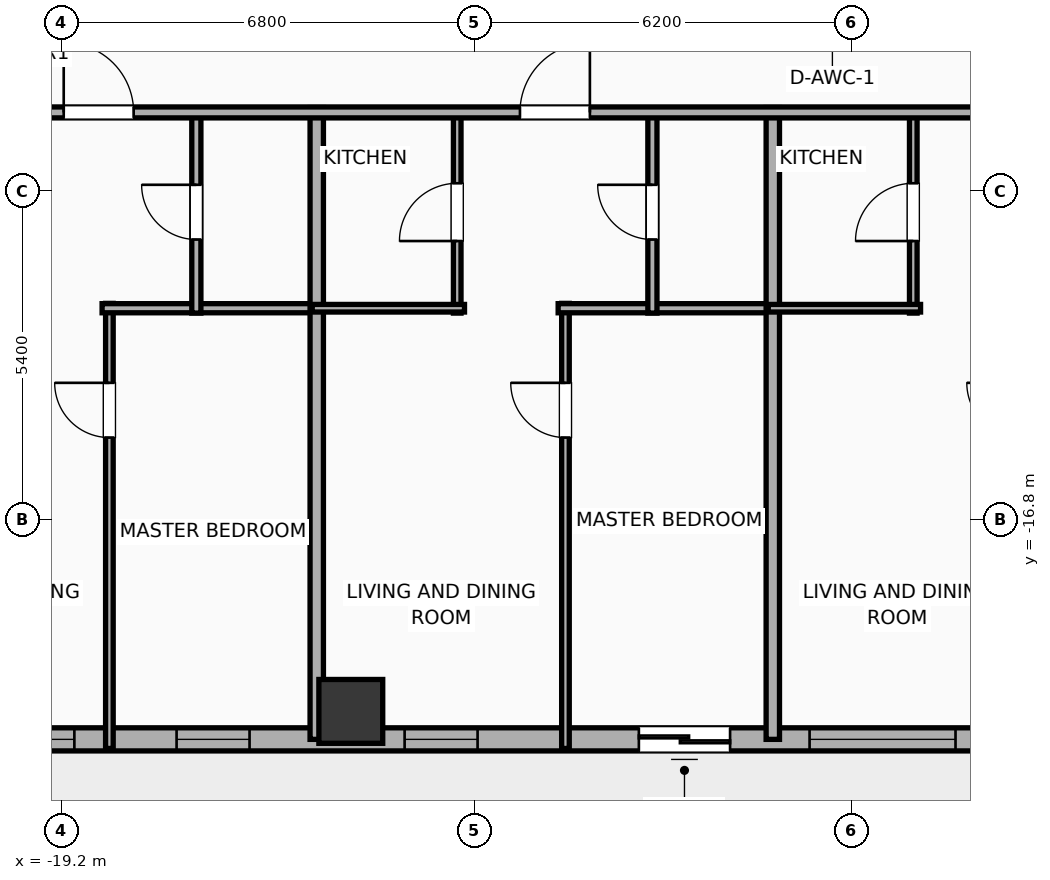
"""IFC4 building model, lengths in metres.
Left out: names, types, materials, properties, quantities, classifications, styles, units other than length and angle.
Written with IfcOpenShell. Run it as: python <this file> out.ifc"""

import sys

from ifc_helpers import new_model, si_unit, direction, frame, frame_2d, origin, origin_2d, place, context, subcontext, project, spatial, rectangle, hollow_rectangle, extrude, element, fill, save


model = new_model("IFC4")
c1 = context("Model", 3, precision=1e-05, world=origin(), true_north=direction((0.0, 1.0)))
c2 = subcontext(c1, "Body", "Model", "MODEL_VIEW")
j1 = project(units=[si_unit("LENGTHUNIT", "METRE"), si_unit("PLANEANGLEUNIT", "RADIAN")], contexts=[c1])
p1 = place(None, origin())
s1 = spatial("IfcSite", under=j1, at=p1, CompositionType="ELEMENT")
p2 = place(p1, origin())
s2 = spatial("IfcBuilding", under=s1, at=p2, CompositionType="ELEMENT")
p3 = place(p2, frame((0.0, 0.0, 113.1)))
s3 = spatial("IfcBuildingStorey", under=s2, at=p3, CompositionType="ELEMENT", Elevation=113.1)
p4 = place(p3, frame((-14.44, -19.95, 0.0), z_axis=(0.0, 0.0, 1.0), x_axis=(1.0, 0.0, 0.0)))
e1 = element("IfcColumn", 1, at=p4, inside=s3, PredefinedType="COLUMN", context=c2, shape_type="SweptSolid", body=[
    extrude(hollow_rectangle(XDim=1.05, YDim=1.05, WallThickness=0.036, at=origin_2d()), origin(), (0.0, 0.0, 1.0), 3.9),
])
p5 = place(p3, frame((29.381, -20.41, 0.0), z_axis=(0.0, 0.0, 1.0), x_axis=(-1.0, 0.0, 0.0)))
e2 = element("IfcWall", 2, at=p5, inside=s3, PredefinedType="ELEMENTEDWALL", context=c2, shape_type="SweptSolid", body=[
    extrude(rectangle(XDim=54.763, YDim=0.38, at=frame_2d((27.381, 0.0))), origin(), (0.0, 0.0, 1.0), 3.65),
])
p6 = place(p5, frame((15.679, 0.0, 0.0)))
e3 = element("IfcOpeningElement", 3, at=p6, cuts=e2, PredefinedType="OPENING", context=c2, shape_type="SweptSolid", body=[
    extrude(rectangle(XDim=1.5, YDim=2.05, at=frame_2d((0.75, 1.025))), frame((0.0, 0.2, 0.0), z_axis=(0.0, -1.0, 0.0), x_axis=(1.0, 0.0, 0.0)), (0.0, 0.0, 1.0), 0.4),
])
p7 = place(p5, frame((7.295, 0.0, 0.75)))
e4 = element("IfcOpeningElement", 4, at=p7, cuts=e2, PredefinedType="OPENING", context=c2, shape_type="SweptSolid", body=[
    extrude(rectangle(XDim=2.4, YDim=2.1, at=frame_2d((1.2, 1.05))), frame((0.0, 0.2, 0.0), z_axis=(0.0, -1.0, 0.0), x_axis=(1.0, 0.0, 0.0)), (0.0, 0.0, 1.0), 0.4),
])
p8 = place(p5, frame((18.486, 0.0, 0.75)))
e5 = element("IfcOpeningElement", 5, at=p8, cuts=e2, PredefinedType="OPENING", context=c2, shape_type="SweptSolid", body=[
    extrude(rectangle(XDim=2.4, YDim=2.1, at=frame_2d((1.2, 1.05))), frame((0.0, 0.2, 0.0), z_axis=(0.0, -1.0, 0.0), x_axis=(1.0, 0.0, 0.0)), (0.0, 0.0, 1.0), 0.4),
])
p9 = place(p5, frame((33.877, 0.0, 0.75)))
e6 = element("IfcOpeningElement", 6, at=p9, cuts=e2, PredefinedType="OPENING", context=c2, shape_type="SweptSolid", body=[
    extrude(rectangle(XDim=2.4, YDim=2.1, at=frame_2d((1.2, 1.05))), frame((0.0, 0.2, 0.0), z_axis=(0.0, -1.0, 0.0), x_axis=(1.0, 0.0, 0.0)), (0.0, 0.0, 1.0), 0.4),
])
p10 = place(p5, frame((48.367, 0.0, 0.75)))
e7 = element("IfcOpeningElement", 7, at=p10, cuts=e2, PredefinedType="OPENING", context=c2, shape_type="SweptSolid", body=[
    extrude(rectangle(XDim=2.4, YDim=2.1, at=frame_2d((1.2, 1.05))), frame((0.0, 0.2, 0.0), z_axis=(0.0, -1.0, 0.0), x_axis=(1.0, 0.0, 0.0)), (0.0, 0.0, 1.0), 0.4),
])
p11 = place(p5, frame((37.584, 0.0, 0.0)))
e8 = element("IfcOpeningElement", 8, at=p11, cuts=e2, PredefinedType="OPENING", context=c2, shape_type="SweptSolid", body=[
    extrude(rectangle(XDim=1.5, YDim=2.05, at=frame_2d((0.75, 1.025))), frame((0.0, 0.2, 0.0), z_axis=(0.0, -1.0, 0.0), x_axis=(1.0, 0.0, 0.0)), (0.0, 0.0, 1.0), 0.4),
])
p12 = place(p5, frame((52.277, 0.0, 0.75)))
e9 = element("IfcOpeningElement", 9, at=p12, cuts=e2, PredefinedType="OPENING", context=c2, shape_type="SweptSolid", body=[
    extrude(rectangle(XDim=1.2, YDim=2.05, at=frame_2d((0.6, 1.025))), frame((0.0, 0.2, 0.0), z_axis=(0.0, -1.0, 0.0), x_axis=(1.0, 0.0, 0.0)), (0.0, 0.0, 1.0), 0.4),
])
p13 = place(p5, frame((45.486, 0.0, 0.75)))
e10 = element("IfcOpeningElement", 10, at=p13, cuts=e2, PredefinedType="OPENING", context=c2, shape_type="SweptSolid", body=[
    extrude(rectangle(XDim=1.2, YDim=2.05, at=frame_2d((0.6, 1.025))), frame((0.0, 0.2, 0.0), z_axis=(0.0, -1.0, 0.0), x_axis=(1.0, 0.0, 0.0)), (0.0, 0.0, 1.0), 0.4),
])
p14 = place(p5, frame((41.736, 0.0, 0.75)))
e11 = element("IfcOpeningElement", 11, at=p14, cuts=e2, PredefinedType="OPENING", context=c2, shape_type="SweptSolid", body=[
    extrude(rectangle(XDim=1.2, YDim=2.05, at=frame_2d((0.6, 1.025))), frame((0.0, 0.2, 0.0), z_axis=(0.0, -1.0, 0.0), x_axis=(1.0, 0.0, 0.0)), (0.0, 0.0, 1.0), 0.4),
])
p15 = place(p5, frame((30.486, 0.0, 0.75)))
e12 = element("IfcOpeningElement", 12, at=p15, cuts=e2, PredefinedType="OPENING", context=c2, shape_type="SweptSolid", body=[
    extrude(rectangle(XDim=1.2, YDim=2.05, at=frame_2d((0.6, 1.025))), frame((0.0, 0.2, 0.0), z_axis=(0.0, -1.0, 0.0), x_axis=(1.0, 0.0, 0.0)), (0.0, 0.0, 1.0), 0.4),
])
p16 = place(p5, frame((26.736, 0.0, 0.75)))
e13 = element("IfcOpeningElement", 13, at=p16, cuts=e2, PredefinedType="OPENING", context=c2, shape_type="SweptSolid", body=[
    extrude(rectangle(XDim=1.2, YDim=2.05, at=frame_2d((0.6, 1.025))), frame((0.0, 0.2, 0.0), z_axis=(0.0, -1.0, 0.0), x_axis=(1.0, 0.0, 0.0)), (0.0, 0.0, 1.0), 0.4),
])
p17 = place(p5, frame((22.986, 0.0, 0.75)))
e14 = element("IfcOpeningElement", 14, at=p17, cuts=e2, PredefinedType="OPENING", context=c2, shape_type="SweptSolid", body=[
    extrude(rectangle(XDim=1.2, YDim=2.05, at=frame_2d((0.6, 1.025))), frame((0.0, 0.2, 0.0), z_axis=(0.0, -1.0, 0.0), x_axis=(1.0, 0.0, 0.0)), (0.0, 0.0, 1.0), 0.4),
])
p18 = place(p5, frame((11.736, 0.0, 0.75)))
e15 = element("IfcOpeningElement", 15, at=p18, cuts=e2, PredefinedType="OPENING", context=c2, shape_type="SweptSolid", body=[
    extrude(rectangle(XDim=1.2, YDim=2.05, at=frame_2d((0.6, 1.025))), frame((0.0, 0.2, 0.0), z_axis=(0.0, -1.0, 0.0), x_axis=(1.0, 0.0, 0.0)), (0.0, 0.0, 1.0), 0.4),
])
p19 = place(p5, frame((3.286, 0.0, 0.75)))
e16 = element("IfcOpeningElement", 16, at=p19, cuts=e2, PredefinedType="OPENING", context=c2, shape_type="SweptSolid", body=[
    extrude(rectangle(XDim=1.2, YDim=2.05, at=frame_2d((0.6, 1.025))), frame((0.0, 0.2, 0.0), z_axis=(0.0, -1.0, 0.0), x_axis=(1.0, 0.0, 0.0)), (0.0, 0.0, 1.0), 0.4),
])
p20 = place(p3, frame((-18.41, -20.56, 0.0), z_axis=(0.0, 0.0, 1.0), x_axis=(0.0, 1.0, 0.0)))
e17 = element("IfcWall", 17, at=p20, inside=s3, PredefinedType="PARTITIONING", context=c2, shape_type="SweptSolid", body=[
    extrude(rectangle(XDim=7.32, YDim=0.125, at=frame_2d((3.66, 0.0))), origin(), (0.0, 0.0, 1.0), 3.65),
])
p21 = place(p20, frame((5.113, 0.0, 0.0)))
e18 = element("IfcOpeningElement", 18, at=p21, cuts=e17, PredefinedType="OPENING", context=c2, shape_type="SweptSolid", body=[
    extrude(rectangle(XDim=0.9, YDim=2.05, at=frame_2d((0.45, 1.025))), frame((0.0, 0.073, 0.0), z_axis=(0.0, -1.0, 0.0), x_axis=(1.0, 0.0, 0.0)), (0.0, 0.0, 1.0), 0.145),
])
p22 = place(p3, frame((-18.53, -13.32, 0.0), z_axis=(0.0, 0.0, 1.0), x_axis=(1.0, 0.0, 0.0)))
e19 = element("IfcWall", 19, at=p22, inside=s3, PredefinedType="PLUMBINGWALL", context=c2, shape_type="SweptSolid", body=[
    extrude(rectangle(XDim=3.605, YDim=0.15, at=frame_2d((1.802, 0.0))), origin(), (0.0, 0.0, 1.0), 3.65),
])
p23 = place(p3, frame((-16.98, -13.4, 0.0), z_axis=(0.0, 0.0, 1.0), x_axis=(0.0, 1.0, 0.0)))
e20 = element("IfcWall", 20, at=p23, inside=s3, PredefinedType="PLUMBINGWALL", context=c2, shape_type="SweptSolid", body=[
    extrude(rectangle(XDim=3.32, YDim=0.15, at=frame_2d((1.66, 0.0))), origin(), (0.0, 0.0, 1.0), 3.65),
])
p24 = place(p23, frame((1.21, 0.0, 0.0)))
e21 = element("IfcOpeningElement", 21, at=p24, cuts=e20, PredefinedType="OPENING", context=c2, shape_type="SweptSolid", body=[
    extrude(rectangle(XDim=0.9, YDim=2.05, at=frame_2d((0.45, 1.025))), frame((0.0, 0.085, 0.0), z_axis=(0.0, -1.0, 0.0), x_axis=(1.0, 0.0, 0.0)), (0.0, 0.0, 1.0), 0.17),
])
p25 = place(p3, frame((-15.0, -20.41, 0.0), z_axis=(0.0, 0.0, 1.0), x_axis=(0.0, 1.0, 0.0)))
e22 = element("IfcWall", 22, at=p25, inside=s3, PredefinedType="PARTITIONING", context=c2, shape_type="SweptSolid", body=[
    extrude(rectangle(XDim=10.39, YDim=0.22, at=frame_2d((5.195, 0.0))), origin(), (0.0, 0.0, 1.0), 3.04),
])
p26 = place(p3, frame((-10.91, -20.56, 0.0), z_axis=(0.0, 0.0, 1.0), x_axis=(0.0, 1.0, 0.0)))
e23 = element("IfcWall", 23, at=p26, inside=s3, PredefinedType="PARTITIONING", context=c2, shape_type="SweptSolid", body=[
    extrude(rectangle(XDim=7.32, YDim=0.125, at=frame_2d((3.66, 0.0))), origin(), (0.0, 0.0, 1.0), 3.65),
])
p27 = place(p26, frame((5.113, 0.0, 0.0)))
e24 = element("IfcOpeningElement", 24, at=p27, cuts=e23, PredefinedType="OPENING", context=c2, shape_type="SweptSolid", body=[
    extrude(rectangle(XDim=0.9, YDim=2.05, at=frame_2d((0.45, 1.025))), frame((0.0, 0.073, 0.0), z_axis=(0.0, -1.0, 0.0), x_axis=(1.0, 0.0, 0.0)), (0.0, 0.0, 1.0), 0.145),
])
p28 = place(p3, frame((-11.03, -13.32, 0.0), z_axis=(0.0, 0.0, 1.0), x_axis=(1.0, 0.0, 0.0)))
e25 = element("IfcWall", 25, at=p28, inside=s3, PredefinedType="PLUMBINGWALL", context=c2, shape_type="SweptSolid", body=[
    extrude(rectangle(XDim=3.605, YDim=0.15, at=frame_2d((1.802, 0.0))), origin(), (0.0, 0.0, 1.0), 3.65),
])
p29 = place(p3, frame((-12.69, -13.4, 0.0), z_axis=(0.0, 0.0, 1.0), x_axis=(0.0, 1.0, 0.0)))
e26 = element("IfcWall", 26, at=p29, inside=s3, PredefinedType="PARTITIONING", context=c2, shape_type="SweptSolid", body=[
    extrude(rectangle(XDim=3.32, YDim=0.125, at=frame_2d((1.66, 0.0))), origin(), (0.0, 0.0, 1.0), 3.65),
])
p30 = place(p29, frame((1.185, 0.0, 0.0)))
e27 = element("IfcOpeningElement", 27, at=p30, cuts=e26, PredefinedType="OPENING", context=c2, shape_type="SweptSolid", body=[
    extrude(rectangle(XDim=0.95, YDim=2.05, at=frame_2d((0.475, 1.025))), frame((0.0, 0.073, 0.0), z_axis=(0.0, -1.0, 0.0), x_axis=(1.0, 0.0, 0.0)), (0.0, 0.0, 1.0), 0.145),
])
p31 = place(p3, frame((-15.075, -13.32, 0.0), z_axis=(0.0, 0.0, 1.0), x_axis=(1.0, 0.0, 0.0)))
e28 = element("IfcWall", 28, at=p31, inside=s3, PredefinedType="PARTITIONING", context=c2, shape_type="SweptSolid", body=[
    extrude(rectangle(XDim=2.505, YDim=0.125, at=frame_2d((1.252, 0.0))), origin(), (0.0, 0.0, 1.0), 3.65),
])
p32 = place(p3, frame((-9.48, -13.4, 0.0), z_axis=(0.0, 0.0, 1.0), x_axis=(0.0, 1.0, 0.0)))
e29 = element("IfcWall", 29, at=p32, inside=s3, PredefinedType="PLUMBINGWALL", context=c2, shape_type="SweptSolid", body=[
    extrude(rectangle(XDim=3.32, YDim=0.15, at=frame_2d((1.66, 0.0))), origin(), (0.0, 0.0, 1.0), 3.65),
])
p33 = place(p32, frame((1.21, 0.0, 0.0)))
e30 = element("IfcOpeningElement", 30, at=p33, cuts=e29, PredefinedType="OPENING", context=c2, shape_type="SweptSolid", body=[
    extrude(rectangle(XDim=0.9, YDim=2.05, at=frame_2d((0.45, 1.025))), frame((0.0, 0.085, 0.0), z_axis=(0.0, -1.0, 0.0), x_axis=(1.0, 0.0, 0.0)), (0.0, 0.0, 1.0), 0.17),
])
p34 = place(p3, frame((-7.5, -20.41, 0.0), z_axis=(0.0, 0.0, 1.0), x_axis=(0.0, 1.0, 0.0)))
e31 = element("IfcWall", 31, at=p34, inside=s3, PredefinedType="PARTITIONING", context=c2, shape_type="SweptSolid", body=[
    extrude(rectangle(XDim=10.39, YDim=0.22, at=frame_2d((5.195, 0.0))), origin(), (0.0, 0.0, 1.0), 3.65),
])
p35 = place(p3, frame((-5.19, -13.4, 0.0), z_axis=(0.0, 0.0, 1.0), x_axis=(0.0, 1.0, 0.0)))
e32 = element("IfcWall", 32, at=p35, inside=s3, PredefinedType="PARTITIONING", context=c2, shape_type="SweptSolid", body=[
    extrude(rectangle(XDim=3.32, YDim=0.125, at=frame_2d((1.66, 0.0))), origin(), (0.0, 0.0, 1.0), 3.65),
])
p36 = place(p35, frame((1.185, 0.0, 0.0)))
e33 = element("IfcOpeningElement", 33, at=p36, cuts=e32, PredefinedType="OPENING", context=c2, shape_type="SweptSolid", body=[
    extrude(rectangle(XDim=0.95, YDim=2.05, at=frame_2d((0.475, 1.025))), frame((0.0, 0.073, 0.0), z_axis=(0.0, -1.0, 0.0), x_axis=(1.0, 0.0, 0.0)), (0.0, 0.0, 1.0), 0.145),
])
p37 = place(p3, frame((-7.575, -13.32, 0.0), z_axis=(0.0, 0.0, 1.0), x_axis=(1.0, 0.0, 0.0)))
e34 = element("IfcWall", 34, at=p37, inside=s3, PredefinedType="PARTITIONING", context=c2, shape_type="SweptSolid", body=[
    extrude(rectangle(XDim=2.505, YDim=0.125, at=frame_2d((1.252, 0.0))), origin(), (0.0, 0.0, 1.0), 3.65),
])
p38 = place(p3, frame((-29.21, -10.1, 0.0), z_axis=(0.0, 0.0, 1.0), x_axis=(1.0, 0.0, 0.0)))
e35 = element("IfcWall", 35, at=p38, inside=s3, PredefinedType="PARTITIONING", context=c2, shape_type="SweptSolid", body=[
    extrude(rectangle(XDim=62.42, YDim=0.18, at=frame_2d((31.21, 0.0))), origin(), (0.0, 0.0, 1.0), 3.65),
])
p39 = place(p38, frame((3.002, 0.0, 0.0)))
e36 = element("IfcOpeningElement", 36, at=p39, cuts=e35, PredefinedType="OPENING", context=c2, shape_type="SweptSolid", body=[
    extrude(rectangle(XDim=0.9, YDim=2.05, at=frame_2d((0.45, 1.025))), frame((0.0, 0.1, 0.0), z_axis=(0.0, -1.0, 0.0), x_axis=(1.0, 0.0, 0.0)), (0.0, 0.0, 1.0), 0.2),
])
p40 = place(p38, frame((10.049, 0.0, 0.0)))
e37 = element("IfcOpeningElement", 37, at=p40, cuts=e35, PredefinedType="OPENING", context=c2, shape_type="SweptSolid", body=[
    extrude(rectangle(XDim=1.15, YDim=2.05, at=frame_2d((0.575, 1.025))), frame((0.0, 0.1, 0.0), z_axis=(0.0, -1.0, 0.0), x_axis=(1.0, 0.0, 0.0)), (0.0, 0.0, 1.0), 0.2),
])
p41 = place(p38, frame((17.552, 0.0, 0.0)))
e38 = element("IfcOpeningElement", 38, at=p41, cuts=e35, PredefinedType="OPENING", context=c2, shape_type="SweptSolid", body=[
    extrude(rectangle(XDim=1.15, YDim=2.05, at=frame_2d((0.575, 1.025))), frame((0.0, 0.1, 0.0), z_axis=(0.0, -1.0, 0.0), x_axis=(1.0, 0.0, 0.0)), (0.0, 0.0, 1.0), 0.2),
])
p42 = place(p38, frame((25.048, 0.0, 0.0)))
e39 = element("IfcOpeningElement", 39, at=p42, cuts=e35, PredefinedType="OPENING", context=c2, shape_type="SweptSolid", body=[
    extrude(rectangle(XDim=1.15, YDim=2.05, at=frame_2d((0.575, 1.025))), frame((0.0, 0.1, 0.0), z_axis=(0.0, -1.0, 0.0), x_axis=(1.0, 0.0, 0.0)), (0.0, 0.0, 1.0), 0.2),
])
p43 = place(p38, frame((32.551, 0.0, 0.0)))
e40 = element("IfcOpeningElement", 40, at=p43, cuts=e35, PredefinedType="OPENING", context=c2, shape_type="SweptSolid", body=[
    extrude(rectangle(XDim=1.15, YDim=2.05, at=frame_2d((0.575, 1.025))), frame((0.0, 0.1, 0.0), z_axis=(0.0, -1.0, 0.0), x_axis=(1.0, 0.0, 0.0)), (0.0, 0.0, 1.0), 0.2),
])
p44 = place(p38, frame((40.048, 0.0, 0.0)))
e41 = element("IfcOpeningElement", 41, at=p44, cuts=e35, PredefinedType="OPENING", context=c2, shape_type="SweptSolid", body=[
    extrude(rectangle(XDim=1.15, YDim=2.05, at=frame_2d((0.575, 1.025))), frame((0.0, 0.1, 0.0), z_axis=(0.0, -1.0, 0.0), x_axis=(1.0, 0.0, 0.0)), (0.0, 0.0, 1.0), 0.2),
])
p45 = place(p38, frame((47.551, 0.0, 0.0)))
e42 = element("IfcOpeningElement", 42, at=p45, cuts=e35, PredefinedType="OPENING", context=c2, shape_type="SweptSolid", body=[
    extrude(rectangle(XDim=1.15, YDim=2.05, at=frame_2d((0.575, 1.025))), frame((0.0, 0.1, 0.0), z_axis=(0.0, -1.0, 0.0), x_axis=(1.0, 0.0, 0.0)), (0.0, 0.0, 1.0), 0.2),
])
p46 = place(p38, frame((57.064, 0.0, 0.0)))
e43 = element("IfcOpeningElement", 43, at=p46, cuts=e35, PredefinedType="OPENING", context=c2, shape_type="SweptSolid", body=[
    extrude(rectangle(XDim=1.15, YDim=2.05, at=frame_2d((0.575, 1.025))), frame((0.0, 0.1, 0.0), z_axis=(0.0, -1.0, 0.0), x_axis=(1.0, 0.0, 0.0)), (0.0, 0.0, 1.0), 0.2),
])
p47 = place(p9, origin())
e44 = element("IfcWindow", 44, at=p47, inside=s3, PartitioningType="SINGLE_PANEL", PredefinedType="WINDOW", context=c2, shape_type="SweptSolid", body=[
    extrude(rectangle(XDim=2.4, YDim=2.1, at=frame_2d((1.2, 1.05))), frame((0.0, 0.03, 0.0), z_axis=(0.0, -1.0, 0.0), x_axis=(1.0, 0.0, 0.0)), (0.0, 0.0, 1.0), 0.06),
])
fill(e6, e44)
p48 = place(p10, origin())
e45 = element("IfcWindow", 45, at=p48, inside=s3, PartitioningType="SINGLE_PANEL", PredefinedType="WINDOW", context=c2, shape_type="SweptSolid", body=[
    extrude(rectangle(XDim=2.4, YDim=2.1, at=frame_2d((1.2, 1.05))), frame((0.0, 0.03, 0.0), z_axis=(0.0, -1.0, 0.0), x_axis=(1.0, 0.0, 0.0)), (0.0, 0.0, 1.0), 0.06),
])
fill(e7, e45)
p49 = place(p11, origin())
e46 = element("IfcDoor", 46, at=p49, inside=s3, OperationType="SLIDING_TO_RIGHT", PredefinedType="DOOR", context=c2, shape_type="SweptSolid", body=[
    extrude(rectangle(XDim=1.5, YDim=2.05, at=frame_2d((0.75, 1.025))), frame((0.0, 0.025, 0.0), z_axis=(0.0, -1.0, 0.0), x_axis=(1.0, 0.0, 0.0)), (0.0, 0.0, 1.0), 0.05),
])
fill(e8, e46)
p50 = place(p13, origin())
e47 = element("IfcWindow", 47, at=p50, inside=s3, PartitioningType="SINGLE_PANEL", PredefinedType="WINDOW", context=c2, shape_type="SweptSolid", body=[
    extrude(rectangle(XDim=1.2, YDim=2.05, at=frame_2d((0.6, 1.025))), frame((0.0, 0.03, 0.0), z_axis=(0.0, -1.0, 0.0), x_axis=(1.0, 0.0, 0.0)), (0.0, 0.0, 1.0), 0.06),
])
fill(e10, e47)
p51 = place(p14, origin())
e48 = element("IfcWindow", 48, at=p51, inside=s3, PartitioningType="SINGLE_PANEL", PredefinedType="WINDOW", context=c2, shape_type="SweptSolid", body=[
    extrude(rectangle(XDim=1.2, YDim=2.05, at=frame_2d((0.6, 1.025))), frame((0.0, 0.03, 0.0), z_axis=(0.0, -1.0, 0.0), x_axis=(1.0, 0.0, 0.0)), (0.0, 0.0, 1.0), 0.06),
])
fill(e11, e48)
p52 = place(p21, origin())
e49 = element("IfcDoor", 49, at=p52, inside=s3, OperationType="SINGLE_SWING_RIGHT", PredefinedType="DOOR", context=c2, shape_type="SweptSolid", body=[
    extrude(rectangle(XDim=0.9, YDim=2.05, at=frame_2d((0.45, 1.025))), frame((0.0, 0.025, 0.0), z_axis=(0.0, -1.0, 0.0), x_axis=(1.0, 0.0, 0.0)), (0.0, 0.0, 1.0), 0.05),
])
fill(e18, e49)
p53 = place(p24, origin())
e50 = element("IfcDoor", 50, at=p53, inside=s3, OperationType="SINGLE_SWING_RIGHT", PredefinedType="DOOR", context=c2, shape_type="SweptSolid", body=[
    extrude(rectangle(XDim=0.9, YDim=2.05, at=frame_2d((0.45, 1.025))), frame((0.0, 0.025, 0.0), z_axis=(0.0, -1.0, 0.0), x_axis=(1.0, 0.0, 0.0)), (0.0, 0.0, 1.0), 0.05),
])
fill(e21, e50)
p54 = place(p27, origin())
e51 = element("IfcDoor", 51, at=p54, inside=s3, OperationType="SINGLE_SWING_RIGHT", PredefinedType="DOOR", context=c2, shape_type="SweptSolid", body=[
    extrude(rectangle(XDim=0.9, YDim=2.05, at=frame_2d((0.45, 1.025))), frame((0.0, 0.025, 0.0), z_axis=(0.0, -1.0, 0.0), x_axis=(1.0, 0.0, 0.0)), (0.0, 0.0, 1.0), 0.05),
])
fill(e24, e51)
p55 = place(p30, origin())
e52 = element("IfcDoor", 52, at=p55, inside=s3, OperationType="SINGLE_SWING_LEFT", PredefinedType="DOOR", context=c2, shape_type="SweptSolid", body=[
    extrude(rectangle(XDim=0.95, YDim=2.05, at=frame_2d((0.475, 1.025))), frame((0.0, 0.025, 0.0), z_axis=(0.0, -1.0, 0.0), x_axis=(1.0, 0.0, 0.0)), (0.0, 0.0, 1.0), 0.05),
])
fill(e27, e52)
p56 = place(p33, origin())
e53 = element("IfcDoor", 53, at=p56, inside=s3, OperationType="SINGLE_SWING_RIGHT", PredefinedType="DOOR", context=c2, shape_type="SweptSolid", body=[
    extrude(rectangle(XDim=0.9, YDim=2.05, at=frame_2d((0.45, 1.025))), frame((0.0, 0.025, 0.0), z_axis=(0.0, -1.0, 0.0), x_axis=(1.0, 0.0, 0.0)), (0.0, 0.0, 1.0), 0.05),
])
fill(e30, e53)
p57 = place(p36, origin())
e54 = element("IfcDoor", 54, at=p57, inside=s3, OperationType="SINGLE_SWING_LEFT", PredefinedType="DOOR", context=c2, shape_type="SweptSolid", body=[
    extrude(rectangle(XDim=0.95, YDim=2.05, at=frame_2d((0.475, 1.025))), frame((0.0, 0.025, 0.0), z_axis=(0.0, -1.0, 0.0), x_axis=(1.0, 0.0, 0.0)), (0.0, 0.0, 1.0), 0.05),
])
fill(e33, e54)
p58 = place(p40, origin())
e55 = element("IfcDoor", 55, at=p58, inside=s3, OperationType="SINGLE_SWING_LEFT", PredefinedType="DOOR", context=c2, shape_type="SweptSolid", body=[
    extrude(rectangle(XDim=1.15, YDim=2.05, at=frame_2d((0.575, 1.025))), frame((0.0, 0.025, 0.0), z_axis=(0.0, -1.0, 0.0), x_axis=(1.0, 0.0, 0.0)), (0.0, 0.0, 1.0), 0.05),
])
fill(e37, e55)
p59 = place(p41, origin())
e56 = element("IfcDoor", 56, at=p59, inside=s3, OperationType="SINGLE_SWING_RIGHT", PredefinedType="DOOR", context=c2, shape_type="SweptSolid", body=[
    extrude(rectangle(XDim=1.15, YDim=2.05, at=frame_2d((0.575, 1.025))), frame((0.0, 0.025, 0.0), z_axis=(0.0, -1.0, 0.0), x_axis=(1.0, 0.0, 0.0)), (0.0, 0.0, 1.0), 0.05),
])
fill(e38, e56)
save(model, sys.argv[1])
